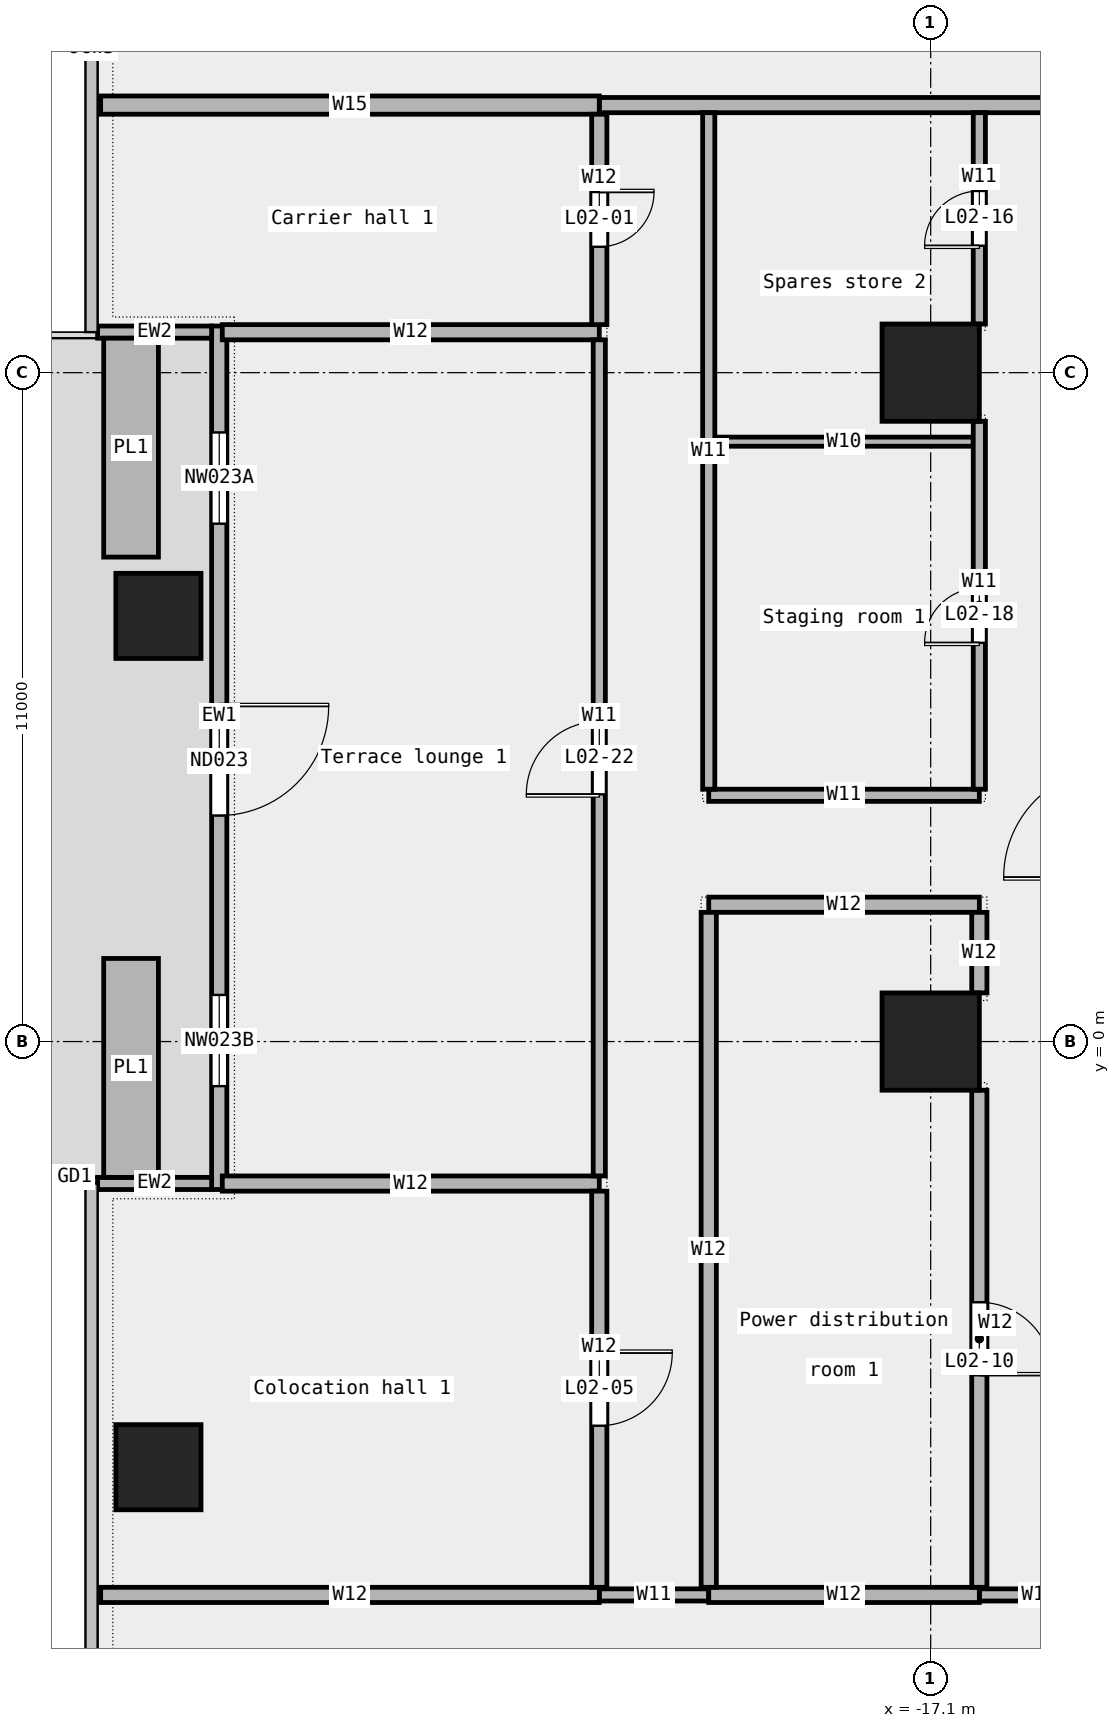
"""IFC4 building model, lengths in metres.
Left out: names, types, materials, properties, quantities, classifications, styles, units other than length and angle.
Written with IfcOpenShell. Run it as: python <this file> out.ifc"""

import sys

from ifc_helpers import new_model, si_unit, direction, frame, frame_2d, origin, origin_2d, place, context, subcontext, project, spatial, rectangle, extrude, element, fill, save


model = new_model("IFC4")
c1 = context("Model", 3, precision=1e-05, world=origin(), true_north=direction((0.0, 1.0)))
c2 = subcontext(c1, "Body", "Model", "MODEL_VIEW")
j1 = project(units=[si_unit("LENGTHUNIT", "METRE"), si_unit("PLANEANGLEUNIT", "RADIAN")], contexts=[c1])
p1 = place(None, origin())
s1 = spatial("IfcSite", under=j1, at=p1, CompositionType="ELEMENT")
p2 = place(p1, origin())
s2 = spatial("IfcBuilding", under=s1, at=p2, CompositionType="ELEMENT")
p3 = place(p2, frame((0.0, 0.0, 14.5)))
s3 = spatial("IfcBuildingStorey", under=s2, at=p3, CompositionType="ELEMENT", Elevation=14.5)
for number, where, z_axis, x_axis in (
    (1, (-29.8, 7.0, 0.0), (0.0, 0.0, 1.0), (1.0, 0.0, 0.0)),
    (2, (-29.8, -7.0, 0.0), (0.0, 0.0, 1.0), (1.0, 0.0, 0.0)),
):
    element("IfcColumn", number, at=place(p3, frame(where, z_axis=z_axis, x_axis=x_axis)), inside=s3, PredefinedType="COLUMN", context=c2, shape_type="SweptSolid", body=[
        extrude(rectangle(XDim=1.4, YDim=1.4, at=origin_2d()), origin(), (0.0, 0.0, 1.0), 5.0),
    ])
for number, where, z_axis, x_axis in (
    (3, (-17.1, 0.0, 0.0), (0.0, 0.0, 1.0), (1.0, 0.0, 0.0)),
    (4, (-17.1, 11.0, 0.0), (0.0, 0.0, 1.0), (1.0, 0.0, 0.0)),
):
    element("IfcColumn", number, at=place(p3, frame(where, z_axis=z_axis, x_axis=x_axis)), inside=s3, PredefinedType="COLUMN", context=c2, shape_type="SweptSolid", body=[
        extrude(rectangle(XDim=1.6, YDim=1.6, at=origin_2d()), origin(), (0.0, 0.0, 1.0), 5.0),
    ])
p4 = place(p3, frame((-28.8, 11.767, 0.0), z_axis=(0.0, 0.0, 1.0), x_axis=(0.0, -1.0, 0.0)))
e5 = element("IfcWall", 5, at=p4, inside=s3, PredefinedType="STANDARD", context=c2, shape_type="SweptSolid", body=[
    extrude(rectangle(XDim=14.2, YDim=0.25, at=frame_2d((7.1, 0.0))), origin(), (0.0, 0.0, 1.0), 5.0),
])
p5 = place(p4, frame((1.75, 0.0, 0.45)))
e6 = element("IfcOpeningElement", 6, at=p5, cuts=e5, PredefinedType="OPENING", context=c2, shape_type="SweptSolid", body=[
    extrude(rectangle(XDim=1.5, YDim=3.0, at=frame_2d((0.75, 1.5))), frame((0.0, 0.137, 0.0), z_axis=(0.0, -1.0, 0.0), x_axis=(1.0, 0.0, 0.0)), (0.0, 0.0, 1.0), 0.274),
])
p6 = place(p4, frame((6.25, 0.0, 0.0)))
e7 = element("IfcOpeningElement", 7, at=p6, cuts=e5, PredefinedType="OPENING", context=c2, shape_type="SweptSolid", body=[
    extrude(rectangle(XDim=1.8, YDim=2.4, at=frame_2d((0.9, 1.2))), frame((0.0, 0.137, 0.0), z_axis=(0.0, -1.0, 0.0), x_axis=(1.0, 0.0, 0.0)), (0.0, 0.0, 1.0), 0.274),
])
p7 = place(p4, frame((11.0, 0.0, 0.45)))
e8 = element("IfcOpeningElement", 8, at=p7, cuts=e5, PredefinedType="OPENING", context=c2, shape_type="SweptSolid", body=[
    extrude(rectangle(XDim=1.5, YDim=3.0, at=frame_2d((0.75, 1.5))), frame((0.0, 0.137, 0.0), z_axis=(0.0, -1.0, 0.0), x_axis=(1.0, 0.0, 0.0)), (0.0, 0.0, 1.0), 0.274),
])
for number, where, z_axis, x_axis in (
    (9, (-30.8, 11.667, 0.0), (0.0, 0.0, 1.0), (1.0, 0.0, 0.0)),
    (10, (-30.8, -2.333, 0.0), (0.0, 0.0, 1.0), (1.0, 0.0, 0.0)),
):
    element("IfcWall", number, at=place(p3, frame(where, z_axis=z_axis, x_axis=x_axis)), inside=s3, PredefinedType="STANDARD", context=c2, shape_type="SweptSolid", body=[
        extrude(rectangle(XDim=1.875, YDim=0.2, at=frame_2d((0.938, 0.0))), origin(), (0.0, 0.0, 1.0), 5.0),
    ])
for number, where, z_axis, x_axis in (
    (11, (-30.25, 11.567, 0.0), (0.0, 0.0, 1.0), (0.0, -1.0, 0.0)),
    (12, (-30.25, 1.367, 0.0), (0.0, 0.0, 1.0), (0.0, -1.0, 0.0)),
):
    element("IfcWall", number, at=place(p3, frame(where, z_axis=z_axis, x_axis=x_axis)), inside=s3, PredefinedType="STANDARD", context=c2, shape_type="SweptSolid", body=[
        extrude(rectangle(XDim=3.6, YDim=0.9, at=frame_2d((1.8, 0.0))), origin(), (0.0, 0.0, 1.0), 0.7),
    ])
p8 = place(p3, frame((-22.55, -9.1, 0.0), z_axis=(0.0, 0.0, 1.0), x_axis=(1.0, 0.0, 0.0)))
e13 = element("IfcWall", 13, at=p8, inside=s3, PredefinedType="PARTITIONING", context=c2, shape_type="SweptSolid", body=[
    extrude(rectangle(XDim=1.8, YDim=0.2, at=frame_2d((0.9, 0.0))), origin(), (0.0, 0.0, 1.0), 5.0),
])
p9 = place(p3, frame((-16.3, -9.1, 0.0), z_axis=(0.0, 0.0, 1.0), x_axis=(1.0, 0.0, 0.0)))
e14 = element("IfcWall", 14, at=p9, inside=s3, PredefinedType="PARTITIONING", context=c2, shape_type="SweptSolid", body=[
    extrude(rectangle(XDim=1.96, YDim=0.2, at=frame_2d((0.98, 0.0))), origin(), (0.0, 0.0, 1.0), 5.0),
])
p10 = place(p3, frame((-30.75, -9.1, 0.0), z_axis=(0.0, 0.0, 1.0), x_axis=(1.0, 0.0, 0.0)))
e15 = element("IfcWall", 15, at=p10, inside=s3, PredefinedType="PARTITIONING", context=c2, shape_type="SweptSolid", body=[
    extrude(rectangle(XDim=8.2, YDim=0.25, at=frame_2d((4.1, 0.0))), origin(), (0.0, 0.0, 1.0), 5.0),
])
p11 = place(p3, frame((-20.75, -9.1, 0.0), z_axis=(0.0, 0.0, 1.0), x_axis=(1.0, 0.0, 0.0)))
e16 = element("IfcWall", 16, at=p11, inside=s3, PredefinedType="PARTITIONING", context=c2, shape_type="SweptSolid", body=[
    extrude(rectangle(XDim=4.45, YDim=0.25, at=frame_2d((2.225, 0.0))), origin(), (0.0, 0.0, 1.0), 5.0),
])
p12 = place(p3, frame((-28.75, -2.335, 0.0), z_axis=(0.0, 0.0, 1.0), x_axis=(1.0, 0.0, 0.0)))
e17 = element("IfcWall", 17, at=p12, inside=s3, PredefinedType="PARTITIONING", context=c2, shape_type="SweptSolid", body=[
    extrude(rectangle(XDim=6.2, YDim=0.25, at=frame_2d((3.1, 0.0))), origin(), (0.0, 0.0, 1.0), 5.0),
])
p13 = place(p3, frame((-20.75, 2.25, 0.0), z_axis=(0.0, 0.0, 1.0), x_axis=(1.0, 0.0, 0.0)))
e18 = element("IfcWall", 18, at=p13, inside=s3, PredefinedType="PARTITIONING", context=c2, shape_type="SweptSolid", body=[
    extrude(rectangle(XDim=4.45, YDim=0.25, at=frame_2d((2.225, 0.0))), origin(), (0.0, 0.0, 1.0), 5.0),
])
p14 = place(p3, frame((-20.75, 4.05, 0.0), z_axis=(0.0, 0.0, 1.0), x_axis=(1.0, 0.0, 0.0)))
e19 = element("IfcWall", 19, at=p14, inside=s3, PredefinedType="PARTITIONING", context=c2, shape_type="SweptSolid", body=[
    extrude(rectangle(XDim=4.45, YDim=0.2, at=frame_2d((2.225, 0.0))), origin(), (0.0, 0.0, 1.0), 5.0),
])
p15 = place(p3, frame((-20.65, 9.865, 0.0), z_axis=(0.0, 0.0, 1.0), x_axis=(1.0, 0.0, 0.0)))
e20 = element("IfcWall", 20, at=p15, inside=s3, PredefinedType="PARTITIONING", context=c2, shape_type="SweptSolid", body=[
    extrude(rectangle(XDim=4.25, YDim=0.15, at=frame_2d((2.125, 0.0))), origin(), (0.0, 0.0, 1.0), 5.0),
])
p16 = place(p3, frame((-28.75, 11.665, 0.0), z_axis=(0.0, 0.0, 1.0), x_axis=(1.0, 0.0, 0.0)))
e21 = element("IfcWall", 21, at=p16, inside=s3, PredefinedType="PARTITIONING", context=c2, shape_type="SweptSolid", body=[
    extrude(rectangle(XDim=6.2, YDim=0.25, at=frame_2d((3.1, 0.0))), origin(), (0.0, 0.0, 1.0), 5.0),
])
p17 = place(p3, frame((-22.55, 15.4, 0.0), z_axis=(0.0, 0.0, 1.0), x_axis=(1.0, 0.0, 0.0)))
e22 = element("IfcWall", 22, at=p17, inside=s3, PredefinedType="PARTITIONING", context=c2, shape_type="SweptSolid", body=[
    extrude(rectangle(XDim=31.715, YDim=0.25, at=frame_2d((15.857, 0.0))), origin(), (0.0, 0.0, 1.0), 5.0),
])
p18 = place(p17, frame((12.485, 0.0, 0.0)))
e23 = element("IfcOpeningElement", 23, at=p18, cuts=e22, PredefinedType="OPENING", context=c2, shape_type="SweptSolid", body=[
    extrude(rectangle(XDim=1.8, YDim=2.1, at=frame_2d((0.9, 1.05))), frame((0.0, 0.137, 0.0), z_axis=(0.0, -1.0, 0.0), x_axis=(1.0, 0.0, 0.0)), (0.0, 0.0, 1.0), 0.274),
])
p19 = place(p17, frame((24.705, 0.0, 0.0)))
e24 = element("IfcOpeningElement", 24, at=p19, cuts=e22, PredefinedType="OPENING", context=c2, shape_type="SweptSolid", body=[
    extrude(rectangle(XDim=1.8, YDim=2.1, at=frame_2d((0.9, 1.05))), frame((0.0, 0.137, 0.0), z_axis=(0.0, -1.0, 0.0), x_axis=(1.0, 0.0, 0.0)), (0.0, 0.0, 1.0), 0.274),
])
p20 = place(p3, frame((-30.75, 15.4, 0.0), z_axis=(0.0, 0.0, 1.0), x_axis=(1.0, 0.0, 0.0)))
e25 = element("IfcWall", 25, at=p20, inside=s3, PredefinedType="PARTITIONING", context=c2, shape_type="SweptSolid", body=[
    extrude(rectangle(XDim=8.2, YDim=0.3, at=frame_2d((4.1, 0.0))), origin(), (0.0, 0.0, 1.0), 5.0),
])
p21 = place(p3, frame((-22.55, -2.21, 0.0), z_axis=(0.0, 0.0, 1.0), x_axis=(0.0, 1.0, 0.0)))
e26 = element("IfcWall", 26, at=p21, inside=s3, PredefinedType="PARTITIONING", context=c2, shape_type="SweptSolid", body=[
    extrude(rectangle(XDim=13.75, YDim=0.2, at=frame_2d((6.875, 0.0))), origin(), (0.0, 0.0, 1.0), 5.0),
])
p22 = place(p21, frame((6.275, 0.0, 0.0)))
e27 = element("IfcOpeningElement", 27, at=p22, cuts=e26, PredefinedType="OPENING", context=c2, shape_type="SweptSolid", body=[
    extrude(rectangle(XDim=1.2, YDim=2.1, at=frame_2d((0.6, 1.05))), frame((0.0, 0.112, 0.0), z_axis=(0.0, -1.0, 0.0), x_axis=(1.0, 0.0, 0.0)), (0.0, 0.0, 1.0), 0.224),
])
p23 = place(p3, frame((-22.55, -8.975, 0.0), z_axis=(0.0, 0.0, 1.0), x_axis=(0.0, 1.0, 0.0)))
e28 = element("IfcWall", 28, at=p23, inside=s3, PredefinedType="PARTITIONING", context=c2, shape_type="SweptSolid", body=[
    extrude(rectangle(XDim=6.515, YDim=0.25, at=frame_2d((3.258, 0.0))), origin(), (0.0, 0.0, 1.0), 5.0),
])
p24 = place(p23, frame((2.657, 0.0, 0.0)))
e29 = element("IfcOpeningElement", 29, at=p24, cuts=e28, PredefinedType="OPENING", context=c2, shape_type="SweptSolid", body=[
    extrude(rectangle(XDim=1.2, YDim=2.1, at=frame_2d((0.6, 1.05))), frame((0.0, 0.137, 0.0), z_axis=(0.0, -1.0, 0.0), x_axis=(1.0, 0.0, 0.0)), (0.0, 0.0, 1.0), 0.274),
])
p25 = place(p3, frame((-22.55, 11.79, 0.0), z_axis=(0.0, 0.0, 1.0), x_axis=(0.0, 1.0, 0.0)))
e30 = element("IfcWall", 30, at=p25, inside=s3, PredefinedType="PARTITIONING", context=c2, shape_type="SweptSolid", body=[
    extrude(rectangle(XDim=3.46, YDim=0.25, at=frame_2d((1.73, 0.0))), origin(), (0.0, 0.0, 1.0), 5.0),
])
p26 = place(p25, frame((1.28, 0.0, 0.0)))
e31 = element("IfcOpeningElement", 31, at=p26, cuts=e30, PredefinedType="OPENING", context=c2, shape_type="SweptSolid", body=[
    extrude(rectangle(XDim=0.9, YDim=2.1, at=frame_2d((0.45, 1.05))), frame((0.0, 0.137, 0.0), z_axis=(0.0, -1.0, 0.0), x_axis=(1.0, 0.0, 0.0)), (0.0, 0.0, 1.0), 0.274),
])
p27 = place(p3, frame((-20.75, 4.15, 0.0), z_axis=(0.0, 0.0, 1.0), x_axis=(0.0, 1.0, 0.0)))
e32 = element("IfcWall", 32, at=p27, inside=s3, PredefinedType="PARTITIONING", context=c2, shape_type="SweptSolid", body=[
    extrude(rectangle(XDim=11.125, YDim=0.2, at=frame_2d((5.562, 0.0))), origin(), (0.0, 0.0, 1.0), 5.0),
])
p28 = place(p3, frame((-20.75, -8.975, 0.0), z_axis=(0.0, 0.0, 1.0), x_axis=(0.0, 1.0, 0.0)))
e33 = element("IfcWall", 33, at=p28, inside=s3, PredefinedType="PARTITIONING", context=c2, shape_type="SweptSolid", body=[
    extrude(rectangle(XDim=11.1, YDim=0.25, at=frame_2d((5.55, 0.0))), origin(), (0.0, 0.0, 1.0), 5.0),
])
p29 = place(p3, frame((-16.3, 4.15, 0.0), z_axis=(0.0, 0.0, 1.0), x_axis=(0.0, 1.0, 0.0)))
e34 = element("IfcWall", 34, at=p29, inside=s3, PredefinedType="PARTITIONING", context=c2, shape_type="SweptSolid", body=[
    extrude(rectangle(XDim=6.05, YDim=0.2, at=frame_2d((3.025, 0.0))), origin(), (0.0, 0.0, 1.0), 5.0),
])
p30 = place(p29, frame((2.407, 0.0, 0.0)))
e35 = element("IfcOpeningElement", 35, at=p30, cuts=e34, PredefinedType="OPENING", context=c2, shape_type="SweptSolid", body=[
    extrude(rectangle(XDim=0.9, YDim=2.1, at=frame_2d((0.45, 1.05))), frame((0.0, 0.112, 0.0), z_axis=(0.0, -1.0, 0.0), x_axis=(1.0, 0.0, 0.0)), (0.0, 0.0, 1.0), 0.224),
])
p31 = place(p3, frame((-16.3, 11.8, 0.0), z_axis=(0.0, 0.0, 1.0), x_axis=(0.0, 1.0, 0.0)))
e36 = element("IfcWall", 36, at=p31, inside=s3, PredefinedType="PARTITIONING", context=c2, shape_type="SweptSolid", body=[
    extrude(rectangle(XDim=3.475, YDim=0.2, at=frame_2d((1.737, 0.0))), origin(), (0.0, 0.0, 1.0), 5.0),
])
p32 = place(p31, frame((1.288, 0.0, 0.0)))
e37 = element("IfcOpeningElement", 37, at=p32, cuts=e36, PredefinedType="OPENING", context=c2, shape_type="SweptSolid", body=[
    extrude(rectangle(XDim=0.9, YDim=2.1, at=frame_2d((0.45, 1.05))), frame((0.0, 0.112, 0.0), z_axis=(0.0, -1.0, 0.0), x_axis=(1.0, 0.0, 0.0)), (0.0, 0.0, 1.0), 0.224),
])
p33 = place(p3, frame((-16.3, -8.975, 0.0), z_axis=(0.0, 0.0, 1.0), x_axis=(0.0, 1.0, 0.0)))
e38 = element("IfcWall", 38, at=p33, inside=s3, PredefinedType="PARTITIONING", context=c2, shape_type="SweptSolid", body=[
    extrude(rectangle(XDim=8.175, YDim=0.25, at=frame_2d((4.087, 0.0))), origin(), (0.0, 0.0, 1.0), 5.0),
])
p34 = place(p33, frame((3.488, 0.0, 0.0)))
e39 = element("IfcOpeningElement", 39, at=p34, cuts=e38, PredefinedType="OPENING", context=c2, shape_type="SweptSolid", body=[
    extrude(rectangle(XDim=1.2, YDim=2.1, at=frame_2d((0.6, 1.05))), frame((0.0, 0.137, 0.0), z_axis=(0.0, -1.0, 0.0), x_axis=(1.0, 0.0, 0.0)), (0.0, 0.0, 1.0), 0.274),
])
p35 = place(p3, frame((-16.3, 0.8, 0.0), z_axis=(0.0, 0.0, 1.0), x_axis=(0.0, 1.0, 0.0)))
e40 = element("IfcWall", 40, at=p35, inside=s3, PredefinedType="PARTITIONING", context=c2, shape_type="SweptSolid", body=[
    extrude(rectangle(XDim=1.325, YDim=0.25, at=frame_2d((0.663, 0.0))), origin(), (0.0, 0.0, 1.0), 5.0),
])
p36 = place(p5, origin())
e41 = element("IfcWindow", 41, at=p36, inside=s3, PartitioningType="SINGLE_PANEL", PredefinedType="WINDOW", context=c2, shape_type="SweptSolid", body=[
    extrude(rectangle(XDim=1.5, YDim=3.0, at=frame_2d((0.75, 1.5))), frame((0.0, 0.03, 0.0), z_axis=(0.0, -1.0, 0.0), x_axis=(1.0, 0.0, 0.0)), (0.0, 0.0, 1.0), 0.06),
])
fill(e6, e41)
p37 = place(p6, origin())
e42 = element("IfcDoor", 42, at=p37, inside=s3, OperationType="DOUBLE_DOOR_SINGLE_SWING", PredefinedType="DOOR", context=c2, shape_type="SweptSolid", body=[
    extrude(rectangle(XDim=1.8, YDim=2.4, at=frame_2d((0.9, 1.2))), frame((0.0, 0.025, 0.0), z_axis=(0.0, -1.0, 0.0), x_axis=(1.0, 0.0, 0.0)), (0.0, 0.0, 1.0), 0.05),
])
fill(e7, e42)
p38 = place(p7, origin())
e43 = element("IfcWindow", 43, at=p38, inside=s3, PartitioningType="SINGLE_PANEL", PredefinedType="WINDOW", context=c2, shape_type="SweptSolid", body=[
    extrude(rectangle(XDim=1.5, YDim=3.0, at=frame_2d((0.75, 1.5))), frame((0.0, 0.03, 0.0), z_axis=(0.0, -1.0, 0.0), x_axis=(1.0, 0.0, 0.0)), (0.0, 0.0, 1.0), 0.06),
])
fill(e8, e43)
p39 = place(p26, origin())
e44 = element("IfcDoor", 44, at=p39, inside=s3, OperationType="SINGLE_SWING_LEFT", PredefinedType="DOOR", context=c2, shape_type="SweptSolid", body=[
    extrude(rectangle(XDim=0.9, YDim=2.1, at=frame_2d((0.45, 1.05))), frame((0.0, 0.025, 0.0), z_axis=(0.0, -1.0, 0.0), x_axis=(1.0, 0.0, 0.0)), (0.0, 0.0, 1.0), 0.05),
])
fill(e31, e44)
p40 = place(p24, origin())
e45 = element("IfcDoor", 45, at=p40, inside=s3, OperationType="SINGLE_SWING_LEFT", PredefinedType="DOOR", context=c2, shape_type="SweptSolid", body=[
    extrude(rectangle(XDim=1.2, YDim=2.1, at=frame_2d((0.6, 1.05))), frame((0.0, 0.025, 0.0), z_axis=(0.0, -1.0, 0.0), x_axis=(1.0, 0.0, 0.0)), (0.0, 0.0, 1.0), 0.05),
])
fill(e29, e45)
p41 = place(p34, origin())
e46 = element("IfcDoor", 46, at=p41, inside=s3, OperationType="SINGLE_SWING_RIGHT", PredefinedType="DOOR", context=c2, shape_type="SweptSolid", body=[
    extrude(rectangle(XDim=1.2, YDim=2.1, at=frame_2d((0.6, 1.05))), frame((0.0, 0.025, 0.0), z_axis=(0.0, -1.0, 0.0), x_axis=(1.0, 0.0, 0.0)), (0.0, 0.0, 1.0), 0.05),
])
fill(e39, e46)
p42 = place(p32, origin())
e47 = element("IfcDoor", 47, at=p42, inside=s3, OperationType="SINGLE_SWING_LEFT", PredefinedType="DOOR", context=c2, shape_type="SweptSolid", body=[
    extrude(rectangle(XDim=0.9, YDim=2.1, at=frame_2d((0.45, 1.05))), frame((0.0, 0.025, 0.0), z_axis=(0.0, -1.0, 0.0), x_axis=(1.0, 0.0, 0.0)), (0.0, 0.0, 1.0), 0.05),
])
fill(e37, e47)
p43 = place(p30, origin())
e48 = element("IfcDoor", 48, at=p43, inside=s3, OperationType="SINGLE_SWING_LEFT", PredefinedType="DOOR", context=c2, shape_type="SweptSolid", body=[
    extrude(rectangle(XDim=0.9, YDim=2.1, at=frame_2d((0.45, 1.05))), frame((0.0, 0.025, 0.0), z_axis=(0.0, -1.0, 0.0), x_axis=(1.0, 0.0, 0.0)), (0.0, 0.0, 1.0), 0.05),
])
fill(e35, e48)
p44 = place(p22, origin())
e49 = element("IfcDoor", 49, at=p44, inside=s3, OperationType="SINGLE_SWING_LEFT", PredefinedType="DOOR", context=c2, shape_type="SweptSolid", body=[
    extrude(rectangle(XDim=1.2, YDim=2.1, at=frame_2d((0.6, 1.05))), frame((0.0, 0.025, 0.0), z_axis=(0.0, -1.0, 0.0), x_axis=(1.0, 0.0, 0.0)), (0.0, 0.0, 1.0), 0.05),
])
fill(e27, e49)
save(model, sys.argv[1])
